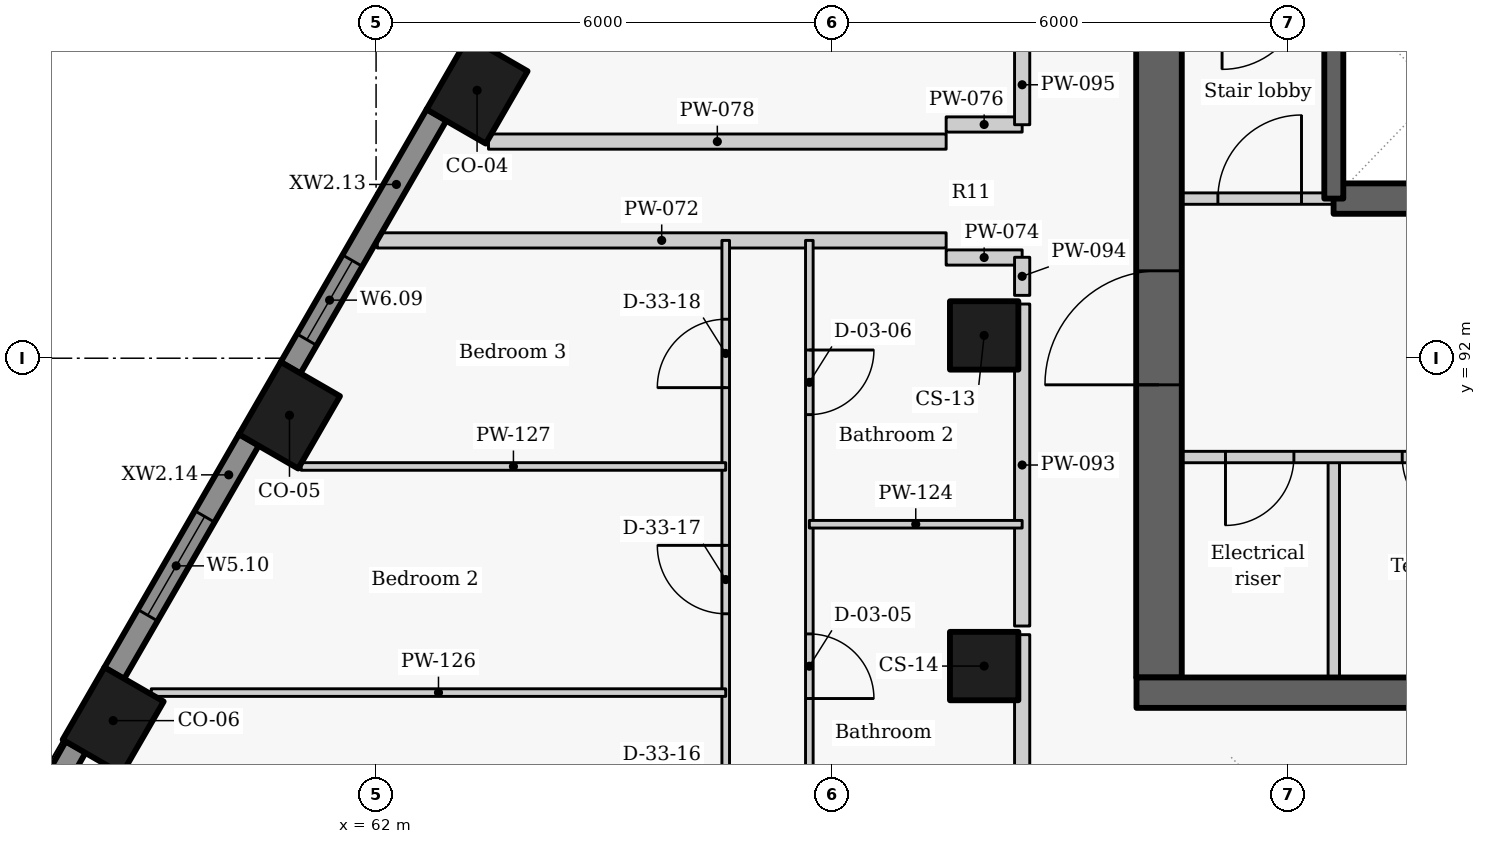
"""IFC4 building model, lengths in metres.
Left out: names, types, materials, properties, quantities, classifications, styles, units other than length and angle.
Written with IfcOpenShell. Run it as: python <this file> out.ifc"""

import sys

from ifc_helpers import new_model, si_unit, direction, frame, frame_2d, origin, origin_2d, place, context, subcontext, project, spatial, rectangle, extrude, element, fill, save


model = new_model("IFC4")
c1 = context("Model", 3, precision=1e-05, world=origin(), true_north=direction((0.0, 1.0)))
c2 = subcontext(c1, "Body", "Model", "MODEL_VIEW")
j1 = project(units=[si_unit("LENGTHUNIT", "METRE"), si_unit("PLANEANGLEUNIT", "RADIAN")], contexts=[c1])
p1 = place(None, origin())
s1 = spatial("IfcSite", under=j1, at=p1, CompositionType="ELEMENT")
p2 = place(p1, origin())
s2 = spatial("IfcBuilding", under=s1, at=p2, CompositionType="ELEMENT")
p3 = place(p2, frame((0.0, 0.0, 226.2)))
s3 = spatial("IfcBuildingStorey", under=s2, at=p3, CompositionType="ELEMENT", Elevation=226.2)
for number, where, z_axis, x_axis in (
    (1, (63.329, 95.525, 0.0), (0.0, 0.0, 1.0), (-0.5, -0.866, 0.0)),
    (2, (60.861, 91.25, 0.0), (0.0, 0.0, 1.0), (-0.5, -0.866, 0.0)),
    (3, (58.541, 87.232, 0.0), (0.0, 0.0, 1.0), (-0.5, -0.866, 0.0)),
):
    element("IfcColumn", number, at=place(p3, frame(where, z_axis=z_axis, x_axis=x_axis)), inside=s3, PredefinedType="COLUMN", context=c2, shape_type="SweptSolid", body=[
        extrude(rectangle(XDim=1.1, YDim=0.9, at=origin_2d()), origin(), (0.0, 0.0, 1.0), 3.3),
    ])
for number, where, z_axis, x_axis in (
    (4, (70.0, 92.3, 0.0), (0.0, 0.0, 1.0), (0.0, -1.0, 0.0)),
    (5, (70.0, 87.95, 0.0), (0.0, 0.0, 1.0), (0.0, -1.0, 0.0)),
):
    element("IfcColumn", number, at=place(p3, frame(where, z_axis=z_axis, x_axis=x_axis)), inside=s3, PredefinedType="COLUMN", context=c2, shape_type="SweptSolid", body=[
        extrude(rectangle(XDim=0.9, YDim=0.9, at=origin_2d()), origin(), (0.0, 0.0, 1.0), 3.3),
    ])
p4 = place(p3, frame((62.796, 95.202, 0.0), z_axis=(0.0, 0.0, 1.0), x_axis=(-0.499984490703, -0.866034357896, 0.0)))
e6 = element("IfcWall", 6, at=p4, inside=s3, PredefinedType="SOLIDWALL", context=c2, shape_type="SweptSolid", body=[
    extrude(rectangle(XDim=3.844, YDim=0.3, at=frame_2d((1.922, 0.0))), origin(), (0.0, 0.0, 1.0), 2.425),
])
p5 = place(p4, frame((2.215, 0.0, 0.9)))
e7 = element("IfcOpeningElement", 7, at=p5, cuts=e6, PredefinedType="OPENING", context=c2, shape_type="SweptSolid", body=[
    extrude(rectangle(XDim=1.2, YDim=1.1, at=frame_2d((0.6, 0.55))), frame((0.0, 0.16, 0.0), z_axis=(0.0, -1.0, 0.0), x_axis=(1.0, 0.0, 0.0)), (0.0, 0.0, 1.0), 0.32),
])
p6 = place(p3, frame((60.328, 90.927, 0.0), z_axis=(0.0, 0.0, 1.0), x_axis=(-0.500010404316, -0.866019396766, 0.0)))
e8 = element("IfcWall", 8, at=p6, inside=s3, PredefinedType="SOLIDWALL", context=c2, shape_type="SweptSolid", body=[
    extrude(rectangle(XDim=3.547, YDim=0.3, at=frame_2d((1.774, 0.0))), origin(), (0.0, 0.0, 1.0), 2.425),
])
p7 = place(p6, frame((1.165, 0.0, 0.9)))
e9 = element("IfcOpeningElement", 9, at=p7, cuts=e8, PredefinedType="OPENING", context=c2, shape_type="SweptSolid", body=[
    extrude(rectangle(XDim=1.5, YDim=1.1, at=frame_2d((0.75, 0.55))), frame((0.0, 0.16, 0.0), z_axis=(0.0, -1.0, 0.0), x_axis=(1.0, 0.0, 0.0)), (0.0, 0.0, 1.0), 0.32),
])
p8 = place(p3, frame((58.048, 86.886, 0.0), z_axis=(0.0, 0.0, 1.0), x_axis=(-0.492080931903, -0.870549456641, 0.0)))
e10 = element("IfcWall", 10, at=p8, inside=s3, PredefinedType="SOLIDWALL", context=c2, shape_type="SweptSolid", body=[
    extrude(rectangle(XDim=5.437, YDim=0.3, at=frame_2d((2.718, 0.0))), origin(), (0.0, 0.0, 1.0), 2.425),
])
p9 = place(p8, frame((0.512, 0.0, 0.9)))
e11 = element("IfcOpeningElement", 11, at=p9, cuts=e10, PredefinedType="OPENING", context=c2, shape_type="SweptSolid", body=[
    extrude(rectangle(XDim=1.5, YDim=1.1, at=frame_2d((0.75, 0.55))), frame((0.0, 0.16, 0.0), z_axis=(0.0, -1.0, 0.0), x_axis=(1.0, 0.0, 0.0)), (0.0, 0.0, 1.0), 0.32),
])
p10 = place(p8, frame((2.942, 0.0, 0.9)))
e12 = element("IfcOpeningElement", 12, at=p10, cuts=e10, PredefinedType="OPENING", context=c2, shape_type="SweptSolid", body=[
    extrude(rectangle(XDim=1.5, YDim=1.1, at=frame_2d((0.75, 0.55))), frame((0.0, 0.16, 0.0), z_axis=(0.0, -1.0, 0.0), x_axis=(1.0, 0.0, 0.0)), (0.0, 0.0, 1.0), 0.32),
])
p11 = place(p3, frame((74.6, 87.8, 0.0), z_axis=(0.0, 0.0, 1.0), x_axis=(0.0, 1.0, 0.0)))
e13 = element("IfcWall", 13, at=p11, inside=s3, PredefinedType="PARTITIONING", context=c2, shape_type="SweptSolid", body=[
    extrude(rectangle(XDim=2.9, YDim=0.15, at=frame_2d((1.45, 0.0))), origin(), (0.0, 0.0, 1.0), 3.025),
])
p12 = place(p3, frame((85.4, 90.7, 0.0), z_axis=(0.0, 0.0, 1.0), x_axis=(-1.0, 0.0, 0.0)))
e14 = element("IfcWall", 14, at=p12, inside=s3, PredefinedType="PARTITIONING", context=c2, shape_type="SweptSolid", body=[
    extrude(rectangle(XDim=13.4, YDim=0.15, at=frame_2d((6.7, 0.0))), origin(), (0.0, 0.0, 1.0), 3.025),
])
p13 = place(p12, frame((11.325, 0.0, 0.0)))
e15 = element("IfcOpeningElement", 15, at=p13, cuts=e14, PredefinedType="OPENING", context=c2, shape_type="SweptSolid", body=[
    extrude(rectangle(XDim=0.9, YDim=2.1, at=frame_2d((0.45, 1.05))), frame((0.0, 0.085, 0.0), z_axis=(0.0, -1.0, 0.0), x_axis=(1.0, 0.0, 0.0)), (0.0, 0.0, 1.0), 0.17),
])
p14 = place(p12, frame((9.0, 0.0, 0.0)))
e16 = element("IfcOpeningElement", 16, at=p14, cuts=e14, PredefinedType="OPENING", context=c2, shape_type="SweptSolid", body=[
    extrude(rectangle(XDim=0.9, YDim=2.1, at=frame_2d((0.45, 1.05))), frame((0.0, 0.085, 0.0), z_axis=(0.0, -1.0, 0.0), x_axis=(1.0, 0.0, 0.0)), (0.0, 0.0, 1.0), 0.17),
])
p15 = place(p12, frame((4.95, 0.0, 0.0)))
e17 = element("IfcOpeningElement", 17, at=p15, cuts=e14, PredefinedType="OPENING", context=c2, shape_type="SweptSolid", body=[
    extrude(rectangle(XDim=0.9, YDim=2.1, at=frame_2d((0.45, 1.05))), frame((0.0, 0.085, 0.0), z_axis=(0.0, -1.0, 0.0), x_axis=(1.0, 0.0, 0.0)), (0.0, 0.0, 1.0), 0.17),
])
p16 = place(p12, frame((0.9, 0.0, 0.0)))
e18 = element("IfcOpeningElement", 18, at=p16, cuts=e14, PredefinedType="OPENING", context=c2, shape_type="SweptSolid", body=[
    extrude(rectangle(XDim=0.9, YDim=2.1, at=frame_2d((0.45, 1.05))), frame((0.0, 0.085, 0.0), z_axis=(0.0, -1.0, 0.0), x_axis=(1.0, 0.0, 0.0)), (0.0, 0.0, 1.0), 0.17),
])
p17 = place(p3, frame((72.3, 87.8, -0.41), z_axis=(0.0, 0.0, 1.0), x_axis=(0.0, 1.0, 0.0)))
e19 = element("IfcWall", 19, at=p17, inside=s3, PredefinedType="SHEAR", context=c2, shape_type="SweptSolid", body=[
    extrude(rectangle(XDim=9.1, YDim=0.6, at=frame_2d((4.55, 0.0))), origin(), (0.0, 0.0, 1.0), 3.435),
])
p18 = place(p17, frame((3.85, 0.0, 0.41)))
e20 = element("IfcOpeningElement", 20, at=p18, cuts=e19, PredefinedType="OPENING", context=c2, shape_type="SweptSolid", body=[
    extrude(rectangle(XDim=1.5, YDim=2.1, at=frame_2d((0.75, 1.05))), frame((0.0, 0.31, 0.0), z_axis=(0.0, -1.0, 0.0), x_axis=(1.0, 0.0, 0.0)), (0.0, 0.0, 1.0), 0.62),
])
p19 = place(p3, frame((72.0, 94.1, 0.0), z_axis=(0.0, 0.0, 1.0), x_axis=(1.0, 0.0, 0.0)))
e21 = element("IfcWall", 21, at=p19, inside=s3, PredefinedType="PARTITIONING", context=c2, shape_type="SweptSolid", body=[
    extrude(rectangle(XDim=2.603, YDim=0.15, at=frame_2d((1.302, 0.0))), origin(), (0.0, 0.0, 1.0), 3.025),
])
p20 = place(p19, frame((1.075, 0.0, 0.0)))
e22 = element("IfcOpeningElement", 22, at=p20, cuts=e21, PredefinedType="OPENING", context=c2, shape_type="SweptSolid", body=[
    extrude(rectangle(XDim=1.1, YDim=2.1, at=frame_2d((0.55, 1.05))), frame((0.0, 0.085, 0.0), z_axis=(0.0, -1.0, 0.0), x_axis=(1.0, 0.0, 0.0)), (0.0, 0.0, 1.0), 0.17),
])
p21 = place(p3, frame((74.597, 94.1, -0.41), z_axis=(0.0, 0.0, 1.0), x_axis=(1.0, 0.0, 0.0)))
e23 = element("IfcWall", 23, at=p21, inside=s3, PredefinedType="SHEAR", context=c2, shape_type="SweptSolid", body=[
    extrude(rectangle(XDim=2.706, YDim=0.4, at=frame_2d((1.353, 0.0))), origin(), (0.0, 0.0, 1.0), 3.435),
])
p22 = place(p3, frame((74.6, 94.1, -0.41), z_axis=(0.0, 0.0, 1.0), x_axis=(0.0, 1.0, 0.0)))
e24 = element("IfcWall", 24, at=p22, inside=s3, PredefinedType="SHEAR", context=c2, shape_type="SweptSolid", body=[
    extrude(rectangle(XDim=2.8, YDim=0.25, at=frame_2d((1.4, 0.0))), origin(), (0.0, 0.0, 1.0), 3.435),
])
p23 = place(p3, frame((62.015, 93.55, 0.0), z_axis=(0.0, 0.0, 1.0), x_axis=(1.0, 0.0, 0.0)))
e25 = element("IfcWall", 25, at=p23, inside=s3, PredefinedType="PARTITIONING", context=c2, shape_type="SweptSolid", body=[
    extrude(rectangle(XDim=7.485, YDim=0.2, at=frame_2d((3.742, 0.0))), origin(), (0.0, 0.0, 1.0), 2.405),
])
for number, where, z_axis, x_axis in (
    (26, (69.5, 93.325, 0.0), (0.0, 0.0, 1.0), (1.0, 0.0, 0.0)),
    (27, (69.5, 95.075, 0.0), (0.0, 0.0, 1.0), (1.0, 0.0, 0.0)),
):
    element("IfcWall", number, at=place(p3, frame(where, z_axis=z_axis, x_axis=x_axis)), inside=s3, PredefinedType="PARTITIONING", context=c2, shape_type="SweptSolid", body=[
        extrude(rectangle(XDim=1.0, YDim=0.2, at=frame_2d((0.5, 0.0))), origin(), (0.0, 0.0, 1.0), 2.505),
    ])
p24 = place(p3, frame((63.479, 94.85, 0.0), z_axis=(0.0, 0.0, 1.0), x_axis=(1.0, 0.0, 0.0)))
e28 = element("IfcWall", 28, at=p24, inside=s3, PredefinedType="PARTITIONING", context=c2, shape_type="SweptSolid", body=[
    extrude(rectangle(XDim=6.021, YDim=0.2, at=frame_2d((3.01, 0.0))), origin(), (0.0, 0.0, 1.0), 3.025),
])
p25 = place(p3, frame((70.5, 83.177, 0.0), z_axis=(0.0, 0.0, 1.0), x_axis=(0.0, 1.0, 0.0)))
e29 = element("IfcWall", 29, at=p25, inside=s3, PredefinedType="PARTITIONING", context=c2, shape_type="SweptSolid", body=[
    extrude(rectangle(XDim=5.186, YDim=0.2, at=frame_2d((2.593, 0.0))), origin(), (0.0, 0.0, 1.0), 3.025),
])
p26 = place(p3, frame((70.5, 88.477, 0.0), z_axis=(0.0, 0.0, 1.0), x_axis=(0.0, 1.0, 0.0)))
e30 = element("IfcWall", 30, at=p26, inside=s3, PredefinedType="PARTITIONING", context=c2, shape_type="SweptSolid", body=[
    extrude(rectangle(XDim=4.236, YDim=0.2, at=frame_2d((2.118, 0.0))), origin(), (0.0, 0.0, 1.0), 3.025),
])
p27 = place(p3, frame((70.5, 92.827, 0.0), z_axis=(0.0, 0.0, 1.0), x_axis=(0.0, 1.0, 0.0)))
e31 = element("IfcWall", 31, at=p27, inside=s3, PredefinedType="PARTITIONING", context=c2, shape_type="SweptSolid", body=[
    extrude(rectangle(XDim=0.501, YDim=0.2, at=frame_2d((0.25, 0.0))), origin(), (0.0, 0.0, 1.0), 3.025),
])
p28 = place(p3, frame((70.5, 95.072, 0.0), z_axis=(0.0, 0.0, 1.0), x_axis=(0.0, 1.0, 0.0)))
e32 = element("IfcWall", 32, at=p28, inside=s3, PredefinedType="PARTITIONING", context=c2, shape_type="SweptSolid", body=[
    extrude(rectangle(XDim=1.051, YDim=0.2, at=frame_2d((0.525, 0.0))), origin(), (0.0, 0.0, 1.0), 3.025),
])
p29 = place(p3, frame((67.7, 93.55, 0.0), z_axis=(0.0, 0.0, 1.0), x_axis=(0.0, -1.0, 0.0)))
e33 = element("IfcWall", 33, at=p29, inside=s3, PredefinedType="PARTITIONING", context=c2, shape_type="SweptSolid", body=[
    extrude(rectangle(XDim=11.95, YDim=0.1, at=frame_2d((5.975, 0.0))), origin(), (0.0, 0.0, 1.0), 3.025),
])
p30 = place(p29, frame((9.259, 0.0, 0.0)))
e34 = element("IfcOpeningElement", 34, at=p30, cuts=e33, PredefinedType="OPENING", context=c2, shape_type="SweptSolid", body=[
    extrude(rectangle(XDim=0.9, YDim=2.1, at=frame_2d((0.45, 1.05))), frame((0.0, 0.06, 0.0), z_axis=(0.0, -1.0, 0.0), x_axis=(1.0, 0.0, 0.0)), (0.0, 0.0, 1.0), 0.12),
])
p31 = place(p29, frame((5.177, 0.0, 0.0)))
e35 = element("IfcOpeningElement", 35, at=p31, cuts=e33, PredefinedType="OPENING", context=c2, shape_type="SweptSolid", body=[
    extrude(rectangle(XDim=0.85, YDim=2.1, at=frame_2d((0.425, 1.05))), frame((0.0, 0.06, 0.0), z_axis=(0.0, -1.0, 0.0), x_axis=(1.0, 0.0, 0.0)), (0.0, 0.0, 1.0), 0.12),
])
p32 = place(p29, frame((1.442, 0.0, 0.0)))
e36 = element("IfcOpeningElement", 36, at=p32, cuts=e33, PredefinedType="OPENING", context=c2, shape_type="SweptSolid", body=[
    extrude(rectangle(XDim=0.85, YDim=2.1, at=frame_2d((0.425, 1.05))), frame((0.0, 0.06, 0.0), z_axis=(0.0, -1.0, 0.0), x_axis=(1.0, 0.0, 0.0)), (0.0, 0.0, 1.0), 0.12),
])
p33 = place(p3, frame((66.6, 67.15, 0.0), z_axis=(0.0, 0.0, 1.0), x_axis=(0.0, 1.0, 0.0)))
e37 = element("IfcWall", 37, at=p33, inside=s3, PredefinedType="PARTITIONING", context=c2, shape_type="SweptSolid", body=[
    extrude(rectangle(XDim=26.4, YDim=0.1, at=frame_2d((13.2, 0.0))), origin(), (0.0, 0.0, 1.0), 3.025),
])
p34 = place(p33, frame((1.744, 0.0, 0.0)))
e38 = element("IfcOpeningElement", 38, at=p34, cuts=e37, PredefinedType="OPENING", context=c2, shape_type="SweptSolid", body=[
    extrude(rectangle(XDim=0.9, YDim=2.1, at=frame_2d((0.45, 1.05))), frame((0.0, 0.06, 0.0), z_axis=(0.0, -1.0, 0.0), x_axis=(1.0, 0.0, 0.0)), (0.0, 0.0, 1.0), 0.12),
])
p35 = place(p33, frame((5.348, 0.0, 0.0)))
e39 = element("IfcOpeningElement", 39, at=p35, cuts=e37, PredefinedType="OPENING", context=c2, shape_type="SweptSolid", body=[
    extrude(rectangle(XDim=0.9, YDim=2.1, at=frame_2d((0.45, 1.05))), frame((0.0, 0.06, 0.0), z_axis=(0.0, -1.0, 0.0), x_axis=(1.0, 0.0, 0.0)), (0.0, 0.0, 1.0), 0.12),
])
p36 = place(p33, frame((8.169, 0.0, 0.0)))
e40 = element("IfcOpeningElement", 40, at=p36, cuts=e37, PredefinedType="OPENING", context=c2, shape_type="SweptSolid", body=[
    extrude(rectangle(XDim=0.9, YDim=2.1, at=frame_2d((0.45, 1.05))), frame((0.0, 0.06, 0.0), z_axis=(0.0, -1.0, 0.0), x_axis=(1.0, 0.0, 0.0)), (0.0, 0.0, 1.0), 0.12),
])
p37 = place(p33, frame((10.99, 0.0, 0.0)))
e41 = element("IfcOpeningElement", 41, at=p37, cuts=e37, PredefinedType="OPENING", context=c2, shape_type="SweptSolid", body=[
    extrude(rectangle(XDim=0.9, YDim=2.1, at=frame_2d((0.45, 1.05))), frame((0.0, 0.06, 0.0), z_axis=(0.0, -1.0, 0.0), x_axis=(1.0, 0.0, 0.0)), (0.0, 0.0, 1.0), 0.12),
])
p38 = place(p33, frame((14.713, 0.0, 0.0)))
e42 = element("IfcOpeningElement", 42, at=p38, cuts=e37, PredefinedType="OPENING", context=c2, shape_type="SweptSolid", body=[
    extrude(rectangle(XDim=0.9, YDim=2.1, at=frame_2d((0.45, 1.05))), frame((0.0, 0.06, 0.0), z_axis=(0.0, -1.0, 0.0), x_axis=(1.0, 0.0, 0.0)), (0.0, 0.0, 1.0), 0.12),
])
p39 = place(p33, frame((18.514, 0.0, 0.0)))
e43 = element("IfcOpeningElement", 43, at=p39, cuts=e37, PredefinedType="OPENING", context=c2, shape_type="SweptSolid", body=[
    extrude(rectangle(XDim=0.9, YDim=2.1, at=frame_2d((0.45, 1.05))), frame((0.0, 0.06, 0.0), z_axis=(0.0, -1.0, 0.0), x_axis=(1.0, 0.0, 0.0)), (0.0, 0.0, 1.0), 0.12),
])
p40 = place(p33, frame((21.488, 0.0, 0.0)))
e44 = element("IfcOpeningElement", 44, at=p40, cuts=e37, PredefinedType="OPENING", context=c2, shape_type="SweptSolid", body=[
    extrude(rectangle(XDim=0.9, YDim=2.1, at=frame_2d((0.45, 1.05))), frame((0.0, 0.06, 0.0), z_axis=(0.0, -1.0, 0.0), x_axis=(1.0, 0.0, 0.0)), (0.0, 0.0, 1.0), 0.12),
])
p41 = place(p33, frame((24.463, 0.0, 0.0)))
e45 = element("IfcOpeningElement", 45, at=p41, cuts=e37, PredefinedType="OPENING", context=c2, shape_type="SweptSolid", body=[
    extrude(rectangle(XDim=0.9, YDim=2.1, at=frame_2d((0.45, 1.05))), frame((0.0, 0.06, 0.0), z_axis=(0.0, -1.0, 0.0), x_axis=(1.0, 0.0, 0.0)), (0.0, 0.0, 1.0), 0.12),
])
p42 = place(p3, frame((67.7, 89.816, 0.0), z_axis=(0.0, 0.0, 1.0), x_axis=(1.0, 0.0, 0.0)))
e46 = element("IfcWall", 46, at=p42, inside=s3, PredefinedType="PARTITIONING", context=c2, shape_type="SweptSolid", body=[
    extrude(rectangle(XDim=2.8, YDim=0.1, at=frame_2d((1.4, 0.0))), origin(), (0.0, 0.0, 1.0), 2.505),
])
p43 = place(p3, frame((59.042, 87.601, 0.0), z_axis=(0.0, 0.0, 1.0), x_axis=(1.0, 0.0, 0.0)))
e47 = element("IfcWall", 47, at=p43, inside=s3, PredefinedType="PARTITIONING", context=c2, shape_type="SweptSolid", body=[
    extrude(rectangle(XDim=7.558, YDim=0.1, at=frame_2d((3.779, 0.0))), origin(), (0.0, 0.0, 1.0), 3.025),
])
p44 = place(p3, frame((61.014, 90.576, 0.0), z_axis=(0.0, 0.0, 1.0), x_axis=(1.0, 0.0, 0.0)))
e48 = element("IfcWall", 48, at=p44, inside=s3, PredefinedType="PARTITIONING", context=c2, shape_type="SweptSolid", body=[
    extrude(rectangle(XDim=5.586, YDim=0.1, at=frame_2d((2.793, 0.0))), origin(), (0.0, 0.0, 1.0), 3.025),
])
p45 = place(p3, frame((72.004, 87.6, -0.41), z_axis=(0.0, 0.0, 1.0), x_axis=(1.0, 0.0, 0.0)))
e49 = element("IfcWall", 49, at=p45, inside=s3, PredefinedType="SHEAR", context=c2, shape_type="SweptSolid", body=[
    extrude(rectangle(XDim=15.992, YDim=0.4, at=frame_2d((7.996, 0.0))), origin(), (0.0, 0.0, 1.0), 3.435),
])
p46 = place(p5, origin())
e50 = element("IfcWindow", 50, at=p46, inside=s3, PartitioningType="SINGLE_PANEL", PredefinedType="WINDOW", context=c2, shape_type="SweptSolid", body=[
    extrude(rectangle(XDim=1.2, YDim=1.1, at=frame_2d((0.6, 0.55))), frame((0.0, 0.03, 0.0), z_axis=(0.0, -1.0, 0.0), x_axis=(1.0, 0.0, 0.0)), (0.0, 0.0, 1.0), 0.06),
])
fill(e7, e50)
p47 = place(p7, origin())
e51 = element("IfcWindow", 51, at=p47, inside=s3, PartitioningType="SINGLE_PANEL", PredefinedType="WINDOW", context=c2, shape_type="SweptSolid", body=[
    extrude(rectangle(XDim=1.5, YDim=1.1, at=frame_2d((0.75, 0.55))), frame((0.0, 0.03, 0.0), z_axis=(0.0, -1.0, 0.0), x_axis=(1.0, 0.0, 0.0)), (0.0, 0.0, 1.0), 0.06),
])
fill(e9, e51)
p48 = place(p13, origin())
e52 = element("IfcDoor", 52, at=p48, inside=s3, OperationType="SINGLE_SWING_RIGHT", PredefinedType="DOOR", context=c2, shape_type="SweptSolid", body=[
    extrude(rectangle(XDim=0.9, YDim=2.1, at=frame_2d((0.45, 1.05))), frame((0.0, 0.025, 0.0), z_axis=(0.0, -1.0, 0.0), x_axis=(1.0, 0.0, 0.0)), (0.0, 0.0, 1.0), 0.05),
])
fill(e15, e52)
p49 = place(p14, origin())
e53 = element("IfcDoor", 53, at=p49, inside=s3, OperationType="SINGLE_SWING_LEFT", PredefinedType="DOOR", context=c2, shape_type="SweptSolid", body=[
    extrude(rectangle(XDim=0.9, YDim=2.1, at=frame_2d((0.45, 1.05))), frame((0.0, 0.025, 0.0), z_axis=(0.0, -1.0, 0.0), x_axis=(1.0, 0.0, 0.0)), (0.0, 0.0, 1.0), 0.05),
])
fill(e16, e53)
p50 = place(p20, origin())
e54 = element("IfcDoor", 54, at=p50, inside=s3, OperationType="SINGLE_SWING_RIGHT", PredefinedType="DOOR", context=c2, shape_type="SweptSolid", body=[
    extrude(rectangle(XDim=1.1, YDim=2.1, at=frame_2d((0.55, 1.05))), frame((0.0, 0.025, 0.0), z_axis=(0.0, -1.0, 0.0), x_axis=(1.0, 0.0, 0.0)), (0.0, 0.0, 1.0), 0.05),
])
fill(e22, e54)
p51 = place(p31, origin())
e55 = element("IfcDoor", 55, at=p51, inside=s3, OperationType="SINGLE_SWING_RIGHT", PredefinedType="DOOR", context=c2, shape_type="SweptSolid", body=[
    extrude(rectangle(XDim=0.85, YDim=2.1, at=frame_2d((0.425, 1.05))), frame((0.0, 0.025, 0.0), z_axis=(0.0, -1.0, 0.0), x_axis=(1.0, 0.0, 0.0)), (0.0, 0.0, 1.0), 0.05),
])
fill(e35, e55)
p52 = place(p32, origin())
e56 = element("IfcDoor", 56, at=p52, inside=s3, OperationType="SINGLE_SWING_LEFT", PredefinedType="DOOR", context=c2, shape_type="SweptSolid", body=[
    extrude(rectangle(XDim=0.85, YDim=2.1, at=frame_2d((0.425, 1.05))), frame((0.0, 0.025, 0.0), z_axis=(0.0, -1.0, 0.0), x_axis=(1.0, 0.0, 0.0)), (0.0, 0.0, 1.0), 0.05),
])
fill(e36, e56)
p53 = place(p40, origin())
e57 = element("IfcDoor", 57, at=p53, inside=s3, OperationType="SINGLE_SWING_RIGHT", PredefinedType="DOOR", context=c2, shape_type="SweptSolid", body=[
    extrude(rectangle(XDim=0.9, YDim=2.1, at=frame_2d((0.45, 1.05))), frame((0.0, 0.025, 0.0), z_axis=(0.0, -1.0, 0.0), x_axis=(1.0, 0.0, 0.0)), (0.0, 0.0, 1.0), 0.05),
])
fill(e44, e57)
p54 = place(p41, origin())
e58 = element("IfcDoor", 58, at=p54, inside=s3, OperationType="SINGLE_SWING_LEFT", PredefinedType="DOOR", context=c2, shape_type="SweptSolid", body=[
    extrude(rectangle(XDim=0.9, YDim=2.1, at=frame_2d((0.45, 1.05))), frame((0.0, 0.025, 0.0), z_axis=(0.0, -1.0, 0.0), x_axis=(1.0, 0.0, 0.0)), (0.0, 0.0, 1.0), 0.05),
])
fill(e45, e58)
p55 = place(p18, origin())
e59 = element("IfcDoor", 59, at=p55, inside=s3, OperationType="DOUBLE_DOOR_SINGLE_SWING", PredefinedType="DOOR", context=c2, shape_type="SweptSolid", body=[
    extrude(rectangle(XDim=1.5, YDim=2.1, at=frame_2d((0.75, 1.05))), frame((0.0, 0.025, 0.0), z_axis=(0.0, -1.0, 0.0), x_axis=(1.0, 0.0, 0.0)), (0.0, 0.0, 1.0), 0.05),
])
fill(e20, e59)
save(model, sys.argv[1])
